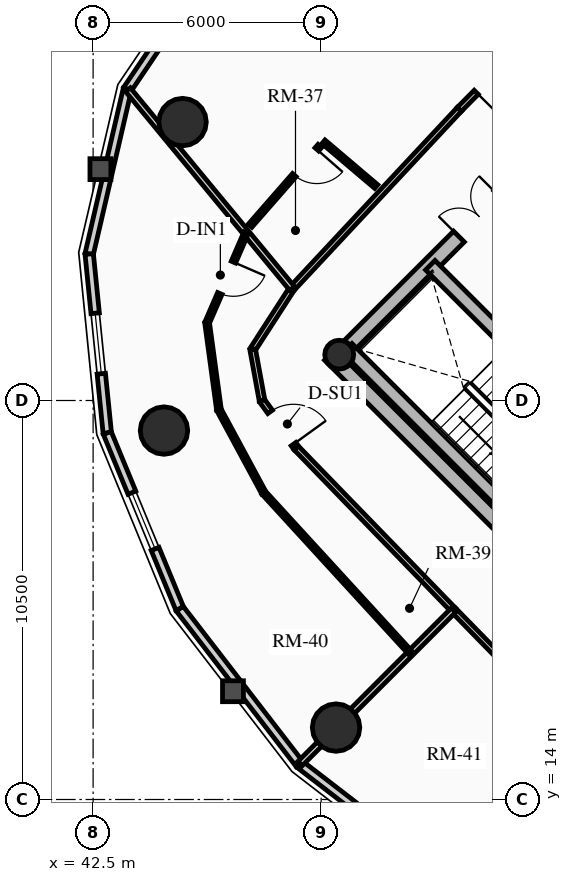
"""IFC4 building model, lengths in metres.
Left out: names, types, materials, properties, quantities, classifications, styles, units other than length and angle.
Written with IfcOpenShell. Run it as: python <this file> out.ifc"""

import sys

from ifc_helpers import new_model, si_unit, direction, frame, frame_2d, origin, origin_2d, place, context, subcontext, project, spatial, rectangle, circle, hollow_circle, extrude, source, transform, mapped, element, fill, save


model = new_model("IFC4")
c1 = context("Model", 3, precision=1e-05, world=origin(), true_north=direction((0.0, 1.0)))
c2 = subcontext(c1, "Body", "Model", "MODEL_VIEW")
j1 = project(units=[si_unit("LENGTHUNIT", "METRE"), si_unit("PLANEANGLEUNIT", "RADIAN")], contexts=[c1])
p1 = place(None, origin())
s1 = spatial("IfcSite", under=j1, at=p1, CompositionType="ELEMENT")
p2 = place(p1, origin())
s2 = spatial("IfcBuilding", under=s1, at=p2, CompositionType="ELEMENT")
p3 = place(p2, frame((0.0, 0.0, 180.7)))
s3 = spatial("IfcBuildingStorey", under=s2, at=p3, CompositionType="ELEMENT", Elevation=180.7)
p4 = place(p3, frame((58.702, 15.732, 0.0), z_axis=(0.0, 0.0, 1.0), x_axis=(-0.707106781187, 0.707106781187, 0.0)))
e1 = element("IfcWall", 1, at=p4, inside=s3, PredefinedType="SHEAR", context=c2, shape_type="SweptSolid", body=[
    extrude(rectangle(XDim=14.1, YDim=0.4, at=frame_2d((7.05, 0.0))), origin(), (0.0, 0.0, 1.0), 2.91),
])
p5 = place(p3, frame((48.873, 25.561, 0.0), z_axis=(0.0, 0.0, 1.0), x_axis=(0.707106781187, 0.707106781187, 0.0)))
e2 = element("IfcWall", 2, at=p5, inside=s3, PredefinedType="SHEAR", context=c2, shape_type="SweptSolid", body=[
    extrude(rectangle(XDim=10.7, YDim=0.4, at=frame_2d((5.35, 0.0))), origin(), (0.0, 0.0, 1.0), 2.91),
])
m1 = source(origin(), c2, "Body", "SweptSolid", [
    extrude(rectangle(XDim=1.5, YDim=2.02, at=frame_2d((0.75, 1.01))), frame((0.0, 0.21, 0.0), z_axis=(0.0, -1.0, 0.0), x_axis=(1.0, 0.0, 0.0)), (0.0, 0.0, 1.0), 0.42),
])
p6 = place(p5, frame((4.6, 0.0, 0.0)))
e3 = element("IfcOpeningElement", 3, at=p6, cuts=e2, PredefinedType="OPENING", context=c2, shape_type="MappedRepresentation", body=[
    mapped(m1, transform((0.0, 0.0, 0.0), x_axis=(1.0, 0.0, 0.0), y_axis=(0.0, 1.0, 0.0), z_axis=(0.0, 0.0, 1.0), scale=1.0)),
])
p7 = place(p3, frame((61.06, 18.373, 0.0), z_axis=(0.0, 0.0, 1.0), x_axis=(-0.707106781187, 0.707106781187, 0.0)))
e4 = element("IfcWall", 4, at=p7, inside=s3, PredefinedType="SHEAR", context=c2, shape_type="SweptSolid", body=[
    extrude(rectangle(XDim=13.7, YDim=0.35, at=frame_2d((6.85, 0.0))), origin(), (0.0, 0.0, 1.0), 2.91),
])
m2 = source(origin(), c2, "Body", "SweptSolid", [
    extrude(rectangle(XDim=1.1, YDim=2.015, at=frame_2d((0.55, 1.007))), frame((0.0, 0.185, 0.0), z_axis=(0.0, -1.0, 0.0), x_axis=(1.0, 0.0, 0.0)), (0.0, 0.0, 1.0), 0.37),
])
p8 = place(p7, frame((4.85, 0.0, 0.0)))
e5 = element("IfcOpeningElement", 5, at=p8, cuts=e4, PredefinedType="OPENING", context=c2, shape_type="MappedRepresentation", body=[
    mapped(m2, transform((0.0, 0.0, 0.0), x_axis=(1.0, 0.0, 0.0), y_axis=(0.0, 1.0, 0.0), z_axis=(0.0, 0.0, 1.0), scale=1.0)),
])
p9 = place(p7, frame((0.625, 0.0, 0.0)))
e6 = element("IfcOpeningElement", 6, at=p9, cuts=e4, PredefinedType="OPENING", context=c2, shape_type="MappedRepresentation", body=[
    mapped(m2, transform((0.0, 0.0, 0.0), x_axis=(1.0, 0.0, 0.0), y_axis=(0.0, 1.0, 0.0), z_axis=(0.0, 0.0, 1.0), scale=1.0)),
])
p10 = place(p7, frame((2.625, 0.0, 0.0)))
e7 = element("IfcOpeningElement", 7, at=p10, cuts=e4, PredefinedType="OPENING", context=c2, shape_type="MappedRepresentation", body=[
    mapped(m2, transform((0.0, 0.0, 0.0), x_axis=(1.0, 0.0, 0.0), y_axis=(0.0, 1.0, 0.0), z_axis=(0.0, 0.0, 1.0), scale=1.0)),
])
m3 = source(origin(), c2, "Body", "SweptSolid", [
    extrude(rectangle(XDim=1.15, YDim=2.02, at=frame_2d((0.575, 1.01))), frame((0.0, 0.185, 0.0), z_axis=(0.0, -1.0, 0.0), x_axis=(1.0, 0.0, 0.0)), (0.0, 0.0, 1.0), 0.37),
])
p11 = place(p7, frame((7.27, 0.0, 0.0)))
e8 = element("IfcOpeningElement", 8, at=p11, cuts=e4, PredefinedType="OPENING", context=c2, shape_type="MappedRepresentation", body=[
    mapped(m3, transform((0.0, 0.0, 0.0), x_axis=(1.0, 0.0, 0.0), y_axis=(0.0, 1.0, 0.0), z_axis=(0.0, 0.0, 1.0), scale=1.0)),
])
p12 = place(p3, frame((53.922, 21.141, 0.0), z_axis=(0.0, 0.0, 1.0), x_axis=(-0.707106781187, 0.707106781187, 0.0)))
e9 = element("IfcWall", 9, at=p12, inside=s3, PredefinedType="SHEAR", context=c2, shape_type="SweptSolid", body=[
    extrude(rectangle(XDim=6.695, YDim=0.35, at=frame_2d((3.348, 0.0))), origin(), (0.0, 0.0, 1.0), 2.91),
])
p13 = place(p3, frame((48.976, 25.706, 0.0), z_axis=(0.0, 0.0, 1.0), x_axis=(0.707106781187, 0.707106781187, 0.0)))
e10 = element("IfcColumn", 10, at=p13, inside=s3, PredefinedType="COLUMN", context=c2, shape_type="SweptSolid", body=[
    extrude(hollow_circle(Radius=0.38, WallThickness=0.032, at=origin_2d()), origin(), (0.0, 0.0, 1.0), 2.91),
])
for number, where, z_axis, x_axis in (
    (11, (44.854, 31.827, 0.0), (0.0, 0.0, 1.0), (1.0, 0.0, 0.0)),
    (12, (44.365, 23.709, 0.0), (0.0, 0.0, 1.0), (1.0, 0.0, 0.0)),
    (13, (48.893, 15.893, 0.0), (0.0, 0.0, 1.0), (1.0, 0.0, 0.0)),
):
    element("IfcColumn", number, at=place(p3, frame(where, z_axis=z_axis, x_axis=x_axis)), inside=s3, PredefinedType="USERDEFINED", context=c2, shape_type="SweptSolid", body=[
        extrude(circle(Radius=0.625, at=origin_2d()), origin(), (0.0, 0.0, 1.0), 2.91),
    ])
p14 = place(p3, frame((43.4, 32.687, 0.0), z_axis=(0.0, 0.0, 1.0), x_axis=(0.55951912514, 0.828817439852, 0.0)))
e14 = element("IfcWall", 14, at=p14, inside=s3, PredefinedType="SOLIDWALL", context=c2, shape_type="SweptSolid", body=[
    extrude(rectangle(XDim=4.259, YDim=0.22, at=frame_2d((2.129, 0.0))), origin(), (0.0, 0.0, 1.0), 2.245),
])
m4 = source(origin(), c2, "Body", "SweptSolid", [
    extrude(rectangle(XDim=1.6, YDim=1.3, at=frame_2d((0.8, 0.65))), frame((0.0, 0.12, 0.0), z_axis=(0.0, -1.0, 0.0), x_axis=(1.0, 0.0, 0.0)), (0.0, 0.0, 1.0), 0.24),
])
p15 = place(p14, frame((1.33, 0.0, 0.65)))
e15 = element("IfcOpeningElement", 15, at=p15, cuts=e14, PredefinedType="OPENING", context=c2, shape_type="MappedRepresentation", body=[
    mapped(m4, transform((0.0, 0.0, 0.0), x_axis=(1.0, 0.0, 0.0), y_axis=(0.0, 1.0, 0.0), z_axis=(0.0, 0.0, 1.0), scale=1.0)),
])
p16 = place(p3, frame((42.397, 28.355, 0.0), z_axis=(0.0, 0.0, 1.0), x_axis=(0.22557328587, 0.97422620202, 0.0)))
e16 = element("IfcWall", 16, at=p16, inside=s3, PredefinedType="SOLIDWALL", context=c2, shape_type="SweptSolid", body=[
    extrude(rectangle(XDim=4.446, YDim=0.22, at=frame_2d((2.223, 0.0))), origin(), (0.0, 0.0, 1.0), 2.245),
])
p17 = place(p3, frame((42.873, 23.646, 0.0), z_axis=(0.0, 0.0, 1.0), x_axis=(-0.100438356004, 0.994943283129, 0.0)))
e17 = element("IfcWall", 17, at=p17, inside=s3, PredefinedType="SOLIDWALL", context=c2, shape_type="SweptSolid", body=[
    extrude(rectangle(XDim=4.733, YDim=0.22, at=frame_2d((2.366, 0.0))), origin(), (0.0, 0.0, 1.0), 2.245),
])
p18 = place(p17, frame((1.566, 0.0, 0.65)))
e18 = element("IfcOpeningElement", 18, at=p18, cuts=e17, PredefinedType="OPENING", context=c2, shape_type="MappedRepresentation", body=[
    mapped(m4, transform((0.0, 0.0, 0.0), x_axis=(1.0, 0.0, 0.0), y_axis=(0.0, 1.0, 0.0), z_axis=(0.0, 0.0, 1.0), scale=1.0)),
])
p19 = place(p3, frame((44.78, 19.021, 0.0), z_axis=(0.0, 0.0, 1.0), x_axis=(-0.381196434348, 0.924494066201, 0.0)))
e19 = element("IfcWall", 19, at=p19, inside=s3, PredefinedType="SOLIDWALL", context=c2, shape_type="SweptSolid", body=[
    extrude(rectangle(XDim=5.003, YDim=0.22, at=frame_2d((2.501, 0.0))), origin(), (0.0, 0.0, 1.0), 2.245),
])
p20 = place(p19, frame((1.702, 0.0, 0.65)))
e20 = element("IfcOpeningElement", 20, at=p20, cuts=e19, PredefinedType="OPENING", context=c2, shape_type="MappedRepresentation", body=[
    mapped(m4, transform((0.0, 0.0, 0.0), x_axis=(1.0, 0.0, 0.0), y_axis=(0.0, 1.0, 0.0), z_axis=(0.0, 0.0, 1.0), scale=1.0)),
])
p21 = place(p3, frame((47.932, 14.932, 0.0), z_axis=(0.0, 0.0, 1.0), x_axis=(-0.610569654715, 0.791962560189, 0.0)))
e21 = element("IfcWall", 21, at=p21, inside=s3, PredefinedType="SOLIDWALL", context=c2, shape_type="SweptSolid", body=[
    extrude(rectangle(XDim=5.163, YDim=0.22, at=frame_2d((2.582, 0.0))), origin(), (0.0, 0.0, 1.0), 2.245),
])
p22 = place(p3, frame((52.021, 11.78, 0.0), z_axis=(0.0, 0.0, 1.0), x_axis=(-0.791962560189, 0.610569654715, 0.0)))
e22 = element("IfcWall", 22, at=p22, inside=s3, PredefinedType="SOLIDWALL", context=c2, shape_type="SweptSolid", body=[
    extrude(rectangle(XDim=5.163, YDim=0.22, at=frame_2d((2.582, 0.0))), origin(), (0.0, 0.0, 1.0), 2.245),
])
p23 = place(p22, frame((1.782, 0.0, 0.65)))
e23 = element("IfcOpeningElement", 23, at=p23, cuts=e22, PredefinedType="OPENING", context=c2, shape_type="MappedRepresentation", body=[
    mapped(m4, transform((0.0, 0.0, 0.0), x_axis=(1.0, 0.0, 0.0), y_axis=(0.0, 1.0, 0.0), z_axis=(0.0, 0.0, 1.0), scale=1.0)),
])
p24 = place(p3, frame((54.488, 34.535, 0.0), z_axis=(0.0, 0.0, 1.0), x_axis=(-0.703666289339, -0.710530613871, 0.0)))
e24 = element("IfcWall", 24, at=p24, inside=s3, PredefinedType="PARTITIONING", context=c2, shape_type="SweptSolid", body=[
    extrude(rectangle(XDim=3.343, YDim=0.15, at=frame_2d((1.672, 0.0))), origin(), (0.0, 0.0, 1.0), 2.245),
])
m5 = source(origin(), c2, "Body", "SweptSolid", [
    extrude(rectangle(XDim=1.05, YDim=2.015, at=frame_2d((0.525, 1.007))), frame((0.0, 0.085, 0.0), z_axis=(0.0, -1.0, 0.0), x_axis=(1.0, 0.0, 0.0)), (0.0, 0.0, 1.0), 0.17),
])
p25 = place(p24, frame((1.66, 0.0, 0.0)))
e25 = element("IfcOpeningElement", 25, at=p25, cuts=e24, PredefinedType="OPENING", context=c2, shape_type="MappedRepresentation", body=[
    mapped(m5, transform((0.0, 0.0, 0.0), x_axis=(1.0, 0.0, 0.0), y_axis=(0.0, 1.0, 0.0), z_axis=(0.0, 0.0, 1.0), scale=1.0)),
])
p26 = place(p3, frame((52.135, 32.159, 0.0), z_axis=(0.0, 0.0, 1.0), x_axis=(-0.682546302454, -0.730842353047, 0.0)))
e26 = element("IfcWall", 26, at=p26, inside=s3, PredefinedType="PARTITIONING", context=c2, shape_type="SweptSolid", body=[
    extrude(rectangle(XDim=6.445, YDim=0.15, at=frame_2d((3.223, 0.0))), origin(), (0.0, 0.0, 1.0), 2.245),
])
p27 = place(p3, frame((47.736, 27.449, 0.0), z_axis=(0.0, 0.0, 1.0), x_axis=(-0.542589259408, -0.839998152126, 0.0)))
e27 = element("IfcWall", 27, at=p27, inside=s3, PredefinedType="PARTITIONING", context=c2, shape_type="SweptSolid", body=[
    extrude(rectangle(XDim=1.912, YDim=0.15, at=frame_2d((0.956, 0.0))), origin(), (0.0, 0.0, 1.0), 2.245),
])
p28 = place(p3, frame((46.699, 25.843, 0.0), z_axis=(0.0, 0.0, 1.0), x_axis=(0.180451258011, -0.983583928032, 0.0)))
e28 = element("IfcWall", 28, at=p28, inside=s3, PredefinedType="PARTITIONING", context=c2, shape_type="SweptSolid", body=[
    extrude(rectangle(XDim=1.372, YDim=0.15, at=frame_2d((0.686, 0.0))), origin(), (0.0, 0.0, 1.0), 2.245),
])
p29 = place(p3, frame((46.946, 24.494, 0.0), z_axis=(0.0, 0.0, 1.0), x_axis=(0.586340262528, -0.810064871809, 0.0)))
e29 = element("IfcWall", 29, at=p29, inside=s3, PredefinedType="PARTITIONING", context=c2, shape_type="SweptSolid", body=[
    extrude(rectangle(XDim=1.531, YDim=0.15, at=frame_2d((0.766, 0.0))), origin(), (0.0, 0.0, 1.0), 2.245),
])
p30 = place(p29, frame((0.361, 0.0, 0.0)))
e30 = element("IfcOpeningElement", 30, at=p30, cuts=e29, PredefinedType="OPENING", context=c2, shape_type="MappedRepresentation", body=[
    mapped(m5, transform((0.0, 0.0, 0.0), x_axis=(1.0, 0.0, 0.0), y_axis=(0.0, 1.0, 0.0), z_axis=(0.0, 0.0, 1.0), scale=1.0)),
])
p31 = place(p3, frame((47.844, 23.253, 0.0), z_axis=(0.0, 0.0, 1.0), x_axis=(0.696248411352, -0.717800912293, 0.0)))
e31 = element("IfcWall", 31, at=p31, inside=s3, PredefinedType="PARTITIONING", context=c2, shape_type="SweptSolid", body=[
    extrude(rectangle(XDim=5.947, YDim=0.15, at=frame_2d((2.974, 0.0))), origin(), (0.0, 0.0, 1.0), 2.675),
])
p32 = place(p3, frame((51.985, 18.985, 0.0), z_axis=(0.0, 0.0, 1.0), x_axis=(0.699619654291, -0.714515457726, 0.0)))
e32 = element("IfcWall", 32, at=p32, inside=s3, PredefinedType="PARTITIONING", context=c2, shape_type="SweptSolid", body=[
    extrude(rectangle(XDim=6.064, YDim=0.15, at=frame_2d((3.032, 0.0))), origin(), (0.0, 0.0, 1.0), 2.245),
])
p33 = place(p3, frame((47.736, 27.449, 0.0), z_axis=(0.0, 0.0, 1.0), x_axis=(-0.636785609289, 0.771040911886, 0.0)))
e33 = element("IfcWall", 33, at=p33, inside=s3, PredefinedType="PARTITIONING", context=c2, shape_type="SweptSolid", body=[
    extrude(rectangle(XDim=6.781, YDim=0.16, at=frame_2d((3.391, 0.0))), origin(), (0.0, 0.0, 1.0), 2.245),
])
p34 = place(p3, frame((51.985, 18.985, 0.0), z_axis=(0.0, 0.0, 1.0), x_axis=(-0.707106781187, -0.707106781187, 0.0)))
e34 = element("IfcWall", 34, at=p34, inside=s3, PredefinedType="PARTITIONING", context=c2, shape_type="SweptSolid", body=[
    extrude(rectangle(XDim=5.711, YDim=0.16, at=frame_2d((2.855, 0.0))), origin(), (0.0, 0.0, 1.0), 2.245),
])
p35 = place(p3, frame((49.949, 30.13, 0.0), z_axis=(0.0, 0.0, 1.0), x_axis=(-0.76253118385, 0.646951461592, 0.0)))
e35 = element("IfcWall", 35, at=p35, inside=s3, PredefinedType="PARTITIONING", context=c2, shape_type="SweptSolid", body=[
    extrude(rectangle(XDim=1.821, YDim=0.125, at=frame_2d((0.91, 0.0))), origin(), (0.0, 0.0, 1.0), 2.675),
])
p36 = place(p3, frame((48.465, 31.199, 0.0), z_axis=(0.0, 0.0, 1.0), x_axis=(-0.658113718436, -0.752918543805, 0.0)))
e36 = element("IfcWall", 36, at=p36, inside=s3, PredefinedType="PARTITIONING", context=c2, shape_type="SweptSolid", body=[
    extrude(rectangle(XDim=2.786, YDim=0.125, at=frame_2d((1.393, 0.0))), origin(), (0.0, 0.0, 1.0), 2.245),
])
m6 = source(origin(), c2, "Body", "SweptSolid", [
    extrude(rectangle(XDim=0.9, YDim=2.005, at=frame_2d((0.45, 1.002))), frame((0.0, 0.073, 0.0), z_axis=(0.0, -1.0, 0.0), x_axis=(1.0, 0.0, 0.0)), (0.0, 0.0, 1.0), 0.145),
])
p37 = place(p36, frame((0.12, 0.0, 0.0)))
e37 = element("IfcOpeningElement", 37, at=p37, cuts=e36, PredefinedType="OPENING", context=c2, shape_type="MappedRepresentation", body=[
    mapped(m6, transform((0.0, 0.0, 0.0), x_axis=(1.0, 0.0, 0.0), y_axis=(0.0, 1.0, 0.0), z_axis=(0.0, 0.0, 1.0), scale=1.0)),
])
p38 = place(p3, frame((46.527, 28.913, 0.0), z_axis=(0.0, 0.0, 1.0), x_axis=(-0.398002989165, -0.917384118358, 0.0)))
e38 = element("IfcWall", 38, at=p38, inside=s3, PredefinedType="PARTITIONING", context=c2, shape_type="SweptSolid", body=[
    extrude(rectangle(XDim=2.581, YDim=0.125, at=frame_2d((1.29, 0.0))), origin(), (0.0, 0.0, 1.0), 2.245),
])
p39 = place(p38, frame((0.84, 0.0, 0.0)))
e39 = element("IfcOpeningElement", 39, at=p39, cuts=e38, PredefinedType="OPENING", context=c2, shape_type="MappedRepresentation", body=[
    mapped(m6, transform((0.0, 0.0, 0.0), x_axis=(1.0, 0.0, 0.0), y_axis=(0.0, 1.0, 0.0), z_axis=(0.0, 0.0, 1.0), scale=1.0)),
])
p40 = place(p3, frame((45.5, 26.546, 0.0), z_axis=(0.0, 0.0, 1.0), x_axis=(0.134877351861, -0.990862301208, 0.0)))
e40 = element("IfcWall", 40, at=p40, inside=s3, PredefinedType="PARTITIONING", context=c2, shape_type="SweptSolid", body=[
    extrude(rectangle(XDim=2.31, YDim=0.125, at=frame_2d((1.155, 0.0))), origin(), (0.0, 0.0, 1.0), 2.245),
])
p41 = place(p3, frame((45.811, 24.257, 0.0), z_axis=(0.0, 0.0, 1.0), x_axis=(0.474867364042, -0.880057376861, 0.0)))
e41 = element("IfcWall", 41, at=p41, inside=s3, PredefinedType="PARTITIONING", context=c2, shape_type="SweptSolid", body=[
    extrude(rectangle(XDim=2.484, YDim=0.125, at=frame_2d((1.242, 0.0))), origin(), (0.0, 0.0, 1.0), 2.245),
])
p42 = place(p3, frame((46.991, 22.071, 0.0), z_axis=(0.0, 0.0, 1.0), x_axis=(0.675455872419, -0.737400409828, 0.0)))
e42 = element("IfcWall", 42, at=p42, inside=s3, PredefinedType="PARTITIONING", context=c2, shape_type="SweptSolid", body=[
    extrude(rectangle(XDim=5.719, YDim=0.125, at=frame_2d((2.859, 0.0))), origin(), (0.0, 0.0, 1.0), 2.675),
])
m7 = source(origin(), c2, "Body", "SweptSolid", [
    extrude(rectangle(XDim=1.6, YDim=1.3, at=frame_2d((0.8, 0.65))), frame((0.0, 0.03, 0.0), z_axis=(0.0, -1.0, 0.0), x_axis=(1.0, 0.0, 0.0)), (0.0, 0.0, 1.0), 0.06),
])
p43 = place(p18, origin())
e43 = element("IfcWindow", 43, at=p43, inside=s3, PartitioningType="SINGLE_PANEL", PredefinedType="WINDOW", context=c2, shape_type="MappedRepresentation", body=[
    mapped(m7, transform((0.0, 0.0, 0.0), x_axis=(1.0, 0.0, 0.0), y_axis=(0.0, 1.0, 0.0), z_axis=(0.0, 0.0, 1.0), scale=1.0)),
])
fill(e18, e43)
p44 = place(p20, origin())
e44 = element("IfcWindow", 44, at=p44, inside=s3, PartitioningType="SINGLE_PANEL", PredefinedType="WINDOW", context=c2, shape_type="MappedRepresentation", body=[
    mapped(m7, transform((0.0, 0.0, 0.0), x_axis=(1.0, 0.0, 0.0), y_axis=(0.0, 1.0, 0.0), z_axis=(0.0, 0.0, 1.0), scale=1.0)),
])
fill(e20, e44)
m8 = source(origin(), c2, "Body", "SweptSolid", [
    extrude(rectangle(XDim=1.5, YDim=2.02, at=frame_2d((0.75, 1.01))), frame((0.0, 0.025, 0.0), z_axis=(0.0, -1.0, 0.0), x_axis=(1.0, 0.0, 0.0)), (0.0, 0.0, 1.0), 0.05),
])
p45 = place(p6, origin())
e45 = element("IfcDoor", 45, at=p45, inside=s3, OperationType="DOUBLE_DOOR_SINGLE_SWING", PredefinedType="DOOR", context=c2, shape_type="MappedRepresentation", body=[
    mapped(m8, transform((0.0, 0.0, 0.0), x_axis=(1.0, 0.0, 0.0), y_axis=(0.0, 1.0, 0.0), z_axis=(0.0, 0.0, 1.0), scale=1.0)),
])
fill(e3, e45)
m9 = source(origin(), c2, "Body", "SweptSolid", [
    extrude(rectangle(XDim=1.05, YDim=2.015, at=frame_2d((0.525, 1.007))), frame((0.0, 0.025, 0.0), z_axis=(0.0, -1.0, 0.0), x_axis=(1.0, 0.0, 0.0)), (0.0, 0.0, 1.0), 0.05),
])
p46 = place(p25, origin())
e46 = element("IfcDoor", 46, at=p46, inside=s3, OperationType="SINGLE_SWING_RIGHT", PredefinedType="DOOR", context=c2, shape_type="MappedRepresentation", body=[
    mapped(m9, transform((0.0, 0.0, 0.0), x_axis=(1.0, 0.0, 0.0), y_axis=(0.0, 1.0, 0.0), z_axis=(0.0, 0.0, 1.0), scale=1.0)),
])
fill(e25, e46)
m10 = source(origin(), c2, "Body", "SweptSolid", [
    extrude(rectangle(XDim=0.9, YDim=2.005, at=frame_2d((0.45, 1.002))), frame((0.0, 0.025, 0.0), z_axis=(0.0, -1.0, 0.0), x_axis=(1.0, 0.0, 0.0)), (0.0, 0.0, 1.0), 0.05),
])
p47 = place(p37, origin())
e47 = element("IfcDoor", 47, at=p47, inside=s3, OperationType="SINGLE_SWING_LEFT", PredefinedType="DOOR", context=c2, shape_type="MappedRepresentation", body=[
    mapped(m10, transform((0.0, 0.0, 0.0), x_axis=(1.0, 0.0, 0.0), y_axis=(0.0, 1.0, 0.0), z_axis=(0.0, 0.0, 1.0), scale=1.0)),
])
fill(e37, e47)
p48 = place(p30, origin())
e48 = element("IfcDoor", 48, at=p48, inside=s3, OperationType="SINGLE_SWING_RIGHT", PredefinedType="DOOR", context=c2, shape_type="MappedRepresentation", body=[
    mapped(m9, transform((0.0, 0.0, 0.0), x_axis=(1.0, 0.0, 0.0), y_axis=(0.0, 1.0, 0.0), z_axis=(0.0, 0.0, 1.0), scale=1.0)),
])
fill(e30, e48)
p49 = place(p39, origin())
e49 = element("IfcDoor", 49, at=p49, inside=s3, OperationType="SINGLE_SWING_LEFT", PredefinedType="DOOR", context=c2, shape_type="MappedRepresentation", body=[
    mapped(m10, transform((0.0, 0.0, 0.0), x_axis=(1.0, 0.0, 0.0), y_axis=(0.0, 1.0, 0.0), z_axis=(0.0, 0.0, 1.0), scale=1.0)),
])
fill(e39, e49)
save(model, sys.argv[1])
